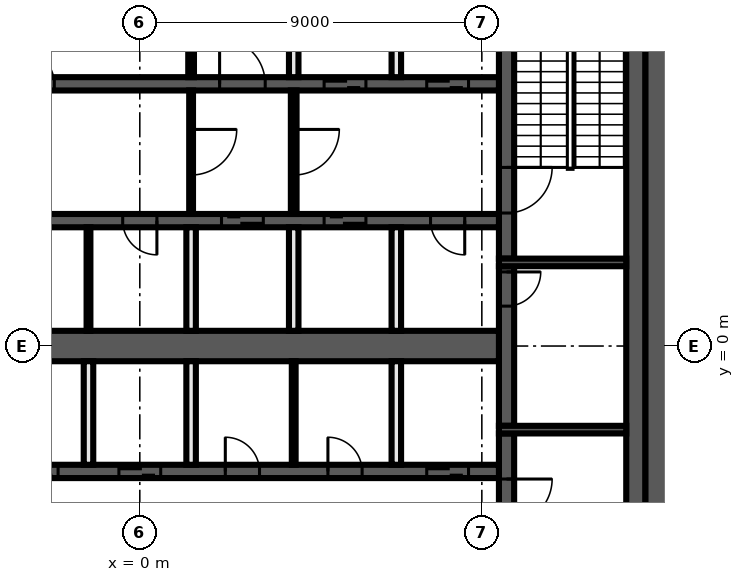
"""IFC4 building model, lengths in metres.
Left out: names, types, materials, properties, quantities, classifications, styles, units other than length and angle.
Written with IfcOpenShell. Run it as: python <this file> out.ifc"""

import sys

from ifc_helpers import new_model, si_unit, direction, frame, frame_2d, origin, place, context, subcontext, project, spatial, rectangle, extrude, element, fill, save


model = new_model("IFC4")
c1 = context("Model", 3, precision=1e-05, world=origin(), true_north=direction((0.0, 1.0)))
c2 = subcontext(c1, "Body", "Model", "MODEL_VIEW")
j1 = project(units=[si_unit("LENGTHUNIT", "METRE"), si_unit("PLANEANGLEUNIT", "RADIAN")], contexts=[c1])
p1 = place(None, origin())
s1 = spatial("IfcSite", under=j1, at=p1, CompositionType="ELEMENT")
p2 = place(p1, origin())
s2 = spatial("IfcBuilding", under=s1, at=p2, CompositionType="ELEMENT")
p3 = place(p2, frame((0.0, 0.0, 262.2)))
s3 = spatial("IfcBuildingStorey", under=s2, at=p3, CompositionType="ELEMENT", Elevation=262.2)
p4 = place(p3, frame((13.65, 10.3, 0.0), z_axis=(0.0, 0.0, 1.0), x_axis=(0.0, -1.0, 0.0)))
e1 = element("IfcWall", 1, at=p4, inside=s3, PredefinedType="SHEAR", context=c2, shape_type="SweptSolid", body=[
    extrude(rectangle(XDim=20.6, YDim=0.7, at=frame_2d((10.3, 0.0))), origin(), (0.0, 0.0, 1.0), 3.82),
])
p5 = place(p3, frame((13.05, 9.8, 0.0), z_axis=(0.0, 0.0, 1.0), x_axis=(0.0, -1.0, 0.0)))
e2 = element("IfcWall", 2, at=p5, inside=s3, PredefinedType="SHEAR", context=c2, shape_type="SweptSolid", body=[
    extrude(rectangle(XDim=19.6, YDim=0.5, at=frame_2d((9.8, 0.0))), origin(), (0.0, 0.0, 1.0), 3.82),
])
p6 = place(p3, frame((9.65, -2.3, 0.0), z_axis=(0.0, 0.0, 1.0), x_axis=(0.0, -1.0, 0.0)))
e3 = element("IfcWall", 3, at=p6, inside=s3, PredefinedType="SHEAR", context=c2, shape_type="SweptSolid", body=[
    extrude(rectangle(XDim=7.5, YDim=0.4, at=frame_2d((3.75, 0.0))), origin(), (0.0, 0.0, 1.0), 3.82),
])
p7 = place(p6, frame((1.2, 0.0, 0.0)))
e4 = element("IfcOpeningElement", 4, at=p7, cuts=e3, PredefinedType="OPENING", context=c2, shape_type="SweptSolid", body=[
    extrude(rectangle(XDim=1.2, YDim=2.1, at=frame_2d((0.6, 1.05))), frame((0.0, 0.21, 0.0), z_axis=(0.0, -1.0, 0.0), x_axis=(1.0, 0.0, 0.0)), (0.0, 0.0, 1.0), 0.42),
])
p8 = place(p3, frame((9.65, 2.1, 0.0), z_axis=(0.0, 0.0, 1.0), x_axis=(0.0, -1.0, 0.0)))
e5 = element("IfcWall", 5, at=p8, inside=s3, PredefinedType="SHEAR", context=c2, shape_type="SweptSolid", body=[
    extrude(rectangle(XDim=4.2, YDim=0.4, at=frame_2d((2.1, 0.0))), origin(), (0.0, 0.0, 1.0), 3.82),
])
p9 = place(p8, frame((0.15, 0.0, 0.0)))
e6 = element("IfcOpeningElement", 6, at=p9, cuts=e5, PredefinedType="OPENING", context=c2, shape_type="SweptSolid", body=[
    extrude(rectangle(XDim=0.9, YDim=2.1, at=frame_2d((0.45, 1.05))), frame((0.0, 0.21, 0.0), z_axis=(0.0, -1.0, 0.0), x_axis=(1.0, 0.0, 0.0)), (0.0, 0.0, 1.0), 0.42),
])
p10 = place(p3, frame((9.65, 9.8, 0.0), z_axis=(0.0, 0.0, 1.0), x_axis=(0.0, -1.0, 0.0)))
e7 = element("IfcWall", 7, at=p10, inside=s3, PredefinedType="SHEAR", context=c2, shape_type="SweptSolid", body=[
    extrude(rectangle(XDim=7.5, YDim=0.4, at=frame_2d((3.75, 0.0))), origin(), (0.0, 0.0, 1.0), 3.82),
])
p11 = place(p10, frame((5.1, 0.0, 0.0)))
e8 = element("IfcOpeningElement", 8, at=p11, cuts=e7, PredefinedType="OPENING", context=c2, shape_type="SweptSolid", body=[
    extrude(rectangle(XDim=1.2, YDim=2.1, at=frame_2d((0.6, 1.05))), frame((0.0, 0.21, 0.0), z_axis=(0.0, -1.0, 0.0), x_axis=(1.0, 0.0, 0.0)), (0.0, 0.0, 1.0), 0.42),
])
for number, where, z_axis, x_axis in (
    (9, (9.45, 2.2, 0.0), (0.0, 0.0, 1.0), (1.0, 0.0, 0.0)),
    (10, (9.45, -2.2, 0.0), (0.0, 0.0, 1.0), (1.0, 0.0, 0.0)),
):
    element("IfcWall", number, at=place(p3, frame(where, z_axis=z_axis, x_axis=x_axis)), inside=s3, PredefinedType="SHEAR", context=c2, shape_type="SweptSolid", body=[
        extrude(rectangle(XDim=3.35, YDim=0.2, at=frame_2d((1.675, 0.0))), origin(), (0.0, 0.0, 1.0), 3.82),
    ])
p12 = place(p3, frame((-9.45, 6.9, 0.0), z_axis=(0.0, 0.0, 1.0), x_axis=(1.0, 0.0, 0.0)))
e11 = element("IfcWall", 11, at=p12, inside=s3, PredefinedType="SHEAR", context=c2, shape_type="SweptSolid", body=[
    extrude(rectangle(XDim=18.9, YDim=0.35, at=frame_2d((9.45, 0.0))), origin(), (0.0, 0.0, 1.0), 3.82),
])
p13 = place(p12, frame((11.55, 0.0, 0.0)))
e12 = element("IfcOpeningElement", 12, at=p13, cuts=e11, PredefinedType="OPENING", context=c2, shape_type="SweptSolid", body=[
    extrude(rectangle(XDim=1.2, YDim=2.1, at=frame_2d((0.6, 1.05))), frame((0.0, 0.185, 0.0), z_axis=(0.0, -1.0, 0.0), x_axis=(1.0, 0.0, 0.0)), (0.0, 0.0, 1.0), 0.37),
])
p14 = place(p12, frame((14.3, 0.0, 0.0)))
e13 = element("IfcOpeningElement", 13, at=p14, cuts=e11, PredefinedType="OPENING", context=c2, shape_type="SweptSolid", body=[
    extrude(rectangle(XDim=1.1, YDim=2.1, at=frame_2d((0.55, 1.05))), frame((0.0, 0.185, 0.0), z_axis=(0.0, -1.0, 0.0), x_axis=(1.0, 0.0, 0.0)), (0.0, 0.0, 1.0), 0.37),
])
p15 = place(p12, frame((17.0, 0.0, 0.0)))
e14 = element("IfcOpeningElement", 14, at=p15, cuts=e11, PredefinedType="OPENING", context=c2, shape_type="SweptSolid", body=[
    extrude(rectangle(XDim=1.1, YDim=2.1, at=frame_2d((0.55, 1.05))), frame((0.0, 0.185, 0.0), z_axis=(0.0, -1.0, 0.0), x_axis=(1.0, 0.0, 0.0)), (0.0, 0.0, 1.0), 0.37),
])
p16 = place(p12, frame((0.9, 0.0, 0.0)))
e15 = element("IfcOpeningElement", 15, at=p16, cuts=e11, PredefinedType="OPENING", context=c2, shape_type="SweptSolid", body=[
    extrude(rectangle(XDim=0.9, YDim=2.1, at=frame_2d((0.45, 1.05))), frame((0.0, 0.185, 0.0), z_axis=(0.0, -1.0, 0.0), x_axis=(1.0, 0.0, 0.0)), (0.0, 0.0, 1.0), 0.37),
])
p17 = place(p12, frame((6.3, 0.0, 0.0)))
e16 = element("IfcOpeningElement", 16, at=p17, cuts=e11, PredefinedType="OPENING", context=c2, shape_type="SweptSolid", body=[
    extrude(rectangle(XDim=0.9, YDim=2.1, at=frame_2d((0.45, 1.05))), frame((0.0, 0.185, 0.0), z_axis=(0.0, -1.0, 0.0), x_axis=(1.0, 0.0, 0.0)), (0.0, 0.0, 1.0), 0.37),
])
p18 = place(p3, frame((9.45, 3.3, 0.0), z_axis=(0.0, 0.0, 1.0), x_axis=(-1.0, 0.0, 0.0)))
e17 = element("IfcWall", 17, at=p18, inside=s3, PredefinedType="SHEAR", context=c2, shape_type="SweptSolid", body=[
    extrude(rectangle(XDim=18.9, YDim=0.35, at=frame_2d((9.45, 0.0))), origin(), (0.0, 0.0, 1.0), 3.82),
])
p19 = place(p18, frame((6.2, 0.0, 0.0)))
e18 = element("IfcOpeningElement", 18, at=p19, cuts=e17, PredefinedType="OPENING", context=c2, shape_type="SweptSolid", body=[
    extrude(rectangle(XDim=1.1, YDim=2.1, at=frame_2d((0.55, 1.05))), frame((0.0, 0.185, 0.0), z_axis=(0.0, -1.0, 0.0), x_axis=(1.0, 0.0, 0.0)), (0.0, 0.0, 1.0), 0.37),
])
p20 = place(p18, frame((3.5, 0.0, 0.0)))
e19 = element("IfcOpeningElement", 19, at=p20, cuts=e17, PredefinedType="OPENING", context=c2, shape_type="SweptSolid", body=[
    extrude(rectangle(XDim=1.1, YDim=2.1, at=frame_2d((0.55, 1.05))), frame((0.0, 0.185, 0.0), z_axis=(0.0, -1.0, 0.0), x_axis=(1.0, 0.0, 0.0)), (0.0, 0.0, 1.0), 0.37),
])
p21 = place(p18, frame((0.9, 0.0, 0.0)))
e20 = element("IfcOpeningElement", 20, at=p21, cuts=e17, PredefinedType="OPENING", context=c2, shape_type="SweptSolid", body=[
    extrude(rectangle(XDim=0.9, YDim=2.1, at=frame_2d((0.45, 1.05))), frame((0.0, 0.185, 0.0), z_axis=(0.0, -1.0, 0.0), x_axis=(1.0, 0.0, 0.0)), (0.0, 0.0, 1.0), 0.37),
])
p22 = place(p18, frame((14.4, 0.0, 0.0)))
e21 = element("IfcOpeningElement", 21, at=p22, cuts=e17, PredefinedType="OPENING", context=c2, shape_type="SweptSolid", body=[
    extrude(rectangle(XDim=0.9, YDim=2.1, at=frame_2d((0.45, 1.05))), frame((0.0, 0.185, 0.0), z_axis=(0.0, -1.0, 0.0), x_axis=(1.0, 0.0, 0.0)), (0.0, 0.0, 1.0), 0.37),
])
p23 = place(p18, frame((9.0, 0.0, 0.0)))
e22 = element("IfcOpeningElement", 22, at=p23, cuts=e17, PredefinedType="OPENING", context=c2, shape_type="SweptSolid", body=[
    extrude(rectangle(XDim=0.9, YDim=2.1, at=frame_2d((0.45, 1.05))), frame((0.0, 0.185, 0.0), z_axis=(0.0, -1.0, 0.0), x_axis=(1.0, 0.0, 0.0)), (0.0, 0.0, 1.0), 0.37),
])
p24 = place(p3, frame((-9.45, -3.3, 0.0), z_axis=(0.0, 0.0, 1.0), x_axis=(1.0, 0.0, 0.0)))
e23 = element("IfcWall", 23, at=p24, inside=s3, PredefinedType="SHEAR", context=c2, shape_type="SweptSolid", body=[
    extrude(rectangle(XDim=18.9, YDim=0.35, at=frame_2d((9.45, 0.0))), origin(), (0.0, 0.0, 1.0), 3.82),
])
p25 = place(p24, frame((0.8, 0.0, 0.0)))
e24 = element("IfcOpeningElement", 24, at=p25, cuts=e23, PredefinedType="OPENING", context=c2, shape_type="SweptSolid", body=[
    extrude(rectangle(XDim=1.1, YDim=2.1, at=frame_2d((0.55, 1.05))), frame((0.0, 0.185, 0.0), z_axis=(0.0, -1.0, 0.0), x_axis=(1.0, 0.0, 0.0)), (0.0, 0.0, 1.0), 0.37),
])
p26 = place(p24, frame((3.5, 0.0, 0.0)))
e25 = element("IfcOpeningElement", 25, at=p26, cuts=e23, PredefinedType="OPENING", context=c2, shape_type="SweptSolid", body=[
    extrude(rectangle(XDim=1.1, YDim=2.1, at=frame_2d((0.55, 1.05))), frame((0.0, 0.185, 0.0), z_axis=(0.0, -1.0, 0.0), x_axis=(1.0, 0.0, 0.0)), (0.0, 0.0, 1.0), 0.37),
])
p27 = place(p24, frame((6.2, 0.0, 0.0)))
e26 = element("IfcOpeningElement", 26, at=p27, cuts=e23, PredefinedType="OPENING", context=c2, shape_type="SweptSolid", body=[
    extrude(rectangle(XDim=1.1, YDim=2.1, at=frame_2d((0.55, 1.05))), frame((0.0, 0.185, 0.0), z_axis=(0.0, -1.0, 0.0), x_axis=(1.0, 0.0, 0.0)), (0.0, 0.0, 1.0), 0.37),
])
p28 = place(p24, frame((8.9, 0.0, 0.0)))
e27 = element("IfcOpeningElement", 27, at=p28, cuts=e23, PredefinedType="OPENING", context=c2, shape_type="SweptSolid", body=[
    extrude(rectangle(XDim=1.1, YDim=2.1, at=frame_2d((0.55, 1.05))), frame((0.0, 0.185, 0.0), z_axis=(0.0, -1.0, 0.0), x_axis=(1.0, 0.0, 0.0)), (0.0, 0.0, 1.0), 0.37),
])
p29 = place(p24, frame((17.0, 0.0, 0.0)))
e28 = element("IfcOpeningElement", 28, at=p29, cuts=e23, PredefinedType="OPENING", context=c2, shape_type="SweptSolid", body=[
    extrude(rectangle(XDim=1.1, YDim=2.1, at=frame_2d((0.55, 1.05))), frame((0.0, 0.185, 0.0), z_axis=(0.0, -1.0, 0.0), x_axis=(1.0, 0.0, 0.0)), (0.0, 0.0, 1.0), 0.37),
])
p30 = place(p24, frame((11.7, 0.0, 0.0)))
e29 = element("IfcOpeningElement", 29, at=p30, cuts=e23, PredefinedType="OPENING", context=c2, shape_type="SweptSolid", body=[
    extrude(rectangle(XDim=0.9, YDim=2.1, at=frame_2d((0.45, 1.05))), frame((0.0, 0.185, 0.0), z_axis=(0.0, -1.0, 0.0), x_axis=(1.0, 0.0, 0.0)), (0.0, 0.0, 1.0), 0.37),
])
p31 = place(p24, frame((14.4, 0.0, 0.0)))
e30 = element("IfcOpeningElement", 30, at=p31, cuts=e23, PredefinedType="OPENING", context=c2, shape_type="SweptSolid", body=[
    extrude(rectangle(XDim=0.9, YDim=2.1, at=frame_2d((0.45, 1.05))), frame((0.0, 0.185, 0.0), z_axis=(0.0, -1.0, 0.0), x_axis=(1.0, 0.0, 0.0)), (0.0, 0.0, 1.0), 0.37),
])
p32 = place(p3, frame((-9.45, 0.0, 0.0), z_axis=(0.0, 0.0, 1.0), x_axis=(1.0, 0.0, 0.0)))
e31 = element("IfcWall", 31, at=p32, inside=s3, PredefinedType="SHEAR", context=c2, shape_type="SweptSolid", body=[
    extrude(rectangle(XDim=18.9, YDim=0.8, at=frame_2d((9.45, 0.0))), origin(), (0.0, 0.0, 1.0), 3.82),
])
for number, where, z_axis, x_axis in (
    (32, (6.75, -3.125, 0.0), (0.0, 0.0, 1.0), (0.0, 1.0, 0.0)),
    (33, (6.75, 0.4, 0.0), (0.0, 0.0, 1.0), (0.0, 1.0, 0.0)),
    (34, (6.75, 7.075, 0.0), (0.0, 0.0, 1.0), (0.0, 1.0, 0.0)),
):
    element("IfcWall", number, at=place(p3, frame(where, z_axis=z_axis, x_axis=x_axis)), inside=s3, PredefinedType="SOLIDWALL", context=c2, shape_type="SweptSolid", body=[
        extrude(rectangle(XDim=2.725, YDim=0.25, at=frame_2d((1.363, 0.0))), origin(), (0.0, 0.0, 1.0), 3.82),
    ])
p33 = place(p3, frame((4.05, 6.725, 0.0), z_axis=(0.0, 0.0, 1.0), x_axis=(0.0, -1.0, 0.0)))
e35 = element("IfcWall", 35, at=p33, inside=s3, PredefinedType="PARTITIONING", context=c2, shape_type="SweptSolid", body=[
    extrude(rectangle(XDim=3.25, YDim=0.15, at=frame_2d((1.625, 0.0))), origin(), (0.0, 0.0, 1.0), 3.82),
])
p34 = place(p33, frame((1.025, 0.0, 0.0)))
e36 = element("IfcOpeningElement", 36, at=p34, cuts=e35, PredefinedType="OPENING", context=c2, shape_type="SweptSolid", body=[
    extrude(rectangle(XDim=1.2, YDim=2.1, at=frame_2d((0.6, 1.05))), frame((0.0, 0.085, 0.0), z_axis=(0.0, -1.0, 0.0), x_axis=(1.0, 0.0, 0.0)), (0.0, 0.0, 1.0), 0.17),
])
p35 = place(p3, frame((4.05, -3.125, 0.0), z_axis=(0.0, 0.0, 1.0), x_axis=(0.0, 1.0, 0.0)))
e37 = element("IfcWall", 37, at=p35, inside=s3, PredefinedType="PARTITIONING", context=c2, shape_type="SweptSolid", body=[
    extrude(rectangle(XDim=2.725, YDim=0.1, at=frame_2d((1.363, 0.0))), origin(), (0.0, 0.0, 1.0), 3.82),
])
for number, where, z_axis, x_axis in (
    (38, (4.05, 0.4, 0.0), (0.0, 0.0, 1.0), (0.0, 1.0, 0.0)),
    (39, (4.05, 7.075, 0.0), (0.0, 0.0, 1.0), (0.0, 1.0, 0.0)),
):
    element("IfcWall", number, at=place(p3, frame(where, z_axis=z_axis, x_axis=x_axis)), inside=s3, PredefinedType="SOLIDWALL", context=c2, shape_type="SweptSolid", body=[
        extrude(rectangle(XDim=2.725, YDim=0.25, at=frame_2d((1.363, 0.0))), origin(), (0.0, 0.0, 1.0), 3.82),
    ])
p36 = place(p3, frame((1.35, 7.075, 0.0), z_axis=(0.0, 0.0, 1.0), x_axis=(0.0, 1.0, 0.0)))
e40 = element("IfcWall", 40, at=p36, inside=s3, PredefinedType="PARTITIONING", context=c2, shape_type="SweptSolid", body=[
    extrude(rectangle(XDim=2.725, YDim=0.15, at=frame_2d((1.363, 0.0))), origin(), (0.0, 0.0, 1.0), 3.82),
])
p37 = place(p3, frame((1.35, 6.725, 0.0), z_axis=(0.0, 0.0, 1.0), x_axis=(0.0, -1.0, 0.0)))
e41 = element("IfcWall", 41, at=p37, inside=s3, PredefinedType="PARTITIONING", context=c2, shape_type="SweptSolid", body=[
    extrude(rectangle(XDim=3.25, YDim=0.1, at=frame_2d((1.625, 0.0))), origin(), (0.0, 0.0, 1.0), 3.82),
])
p38 = place(p37, frame((1.025, 0.0, 0.0)))
e42 = element("IfcOpeningElement", 42, at=p38, cuts=e41, PredefinedType="OPENING", context=c2, shape_type="SweptSolid", body=[
    extrude(rectangle(XDim=1.2, YDim=2.1, at=frame_2d((0.6, 1.05))), frame((0.0, 0.06, 0.0), z_axis=(0.0, -1.0, 0.0), x_axis=(1.0, 0.0, 0.0)), (0.0, 0.0, 1.0), 0.12),
])
for number, where, z_axis, x_axis in (
    (43, (1.35, -3.125, 0.0), (0.0, 0.0, 1.0), (0.0, 1.0, 0.0)),
    (44, (1.35, 0.4, 0.0), (0.0, 0.0, 1.0), (0.0, 1.0, 0.0)),
):
    element("IfcWall", number, at=place(p3, frame(where, z_axis=z_axis, x_axis=x_axis)), inside=s3, PredefinedType="SOLIDWALL", context=c2, shape_type="SweptSolid", body=[
        extrude(rectangle(XDim=2.725, YDim=0.25, at=frame_2d((1.363, 0.0))), origin(), (0.0, 0.0, 1.0), 3.82),
    ])
p39 = place(p3, frame((-1.35, 0.4, 0.0), z_axis=(0.0, 0.0, 1.0), x_axis=(0.0, 1.0, 0.0)))
e45 = element("IfcWall", 45, at=p39, inside=s3, PredefinedType="PARTITIONING", context=c2, shape_type="SweptSolid", body=[
    extrude(rectangle(XDim=2.725, YDim=0.1, at=frame_2d((1.363, 0.0))), origin(), (0.0, 0.0, 1.0), 3.82),
])
p40 = place(p3, frame((-1.35, -3.125, 0.0), z_axis=(0.0, 0.0, 1.0), x_axis=(0.0, 1.0, 0.0)))
e46 = element("IfcWall", 46, at=p40, inside=s3, PredefinedType="SOLIDWALL", context=c2, shape_type="SweptSolid", body=[
    extrude(rectangle(XDim=2.725, YDim=0.25, at=frame_2d((1.363, 0.0))), origin(), (0.0, 0.0, 1.0), 3.82),
])
p41 = place(p9, origin())
e47 = element("IfcDoor", 47, at=p41, inside=s3, OperationType="SINGLE_SWING_RIGHT", PredefinedType="DOOR", context=c2, shape_type="SweptSolid", body=[
    extrude(rectangle(XDim=0.9, YDim=2.1, at=frame_2d((0.45, 1.05))), frame((0.0, 0.025, 0.0), z_axis=(0.0, -1.0, 0.0), x_axis=(1.0, 0.0, 0.0)), (0.0, 0.0, 1.0), 0.05),
])
fill(e6, e47)
p42 = place(p13, origin())
e48 = element("IfcDoor", 48, at=p42, inside=s3, OperationType="SINGLE_SWING_LEFT", PredefinedType="DOOR", context=c2, shape_type="SweptSolid", body=[
    extrude(rectangle(XDim=1.2, YDim=2.1, at=frame_2d((0.6, 1.05))), frame((0.0, 0.025, 0.0), z_axis=(0.0, -1.0, 0.0), x_axis=(1.0, 0.0, 0.0)), (0.0, 0.0, 1.0), 0.05),
])
fill(e12, e48)
p43 = place(p14, origin())
e49 = element("IfcDoor", 49, at=p43, inside=s3, OperationType="DOUBLE_DOOR_SLIDING", PredefinedType="DOOR", context=c2, shape_type="SweptSolid", body=[
    extrude(rectangle(XDim=1.1, YDim=2.1, at=frame_2d((0.55, 1.05))), frame((0.0, 0.025, 0.0), z_axis=(0.0, -1.0, 0.0), x_axis=(1.0, 0.0, 0.0)), (0.0, 0.0, 1.0), 0.05),
])
fill(e13, e49)
p44 = place(p15, origin())
e50 = element("IfcDoor", 50, at=p44, inside=s3, OperationType="DOUBLE_DOOR_SLIDING", PredefinedType="DOOR", context=c2, shape_type="SweptSolid", body=[
    extrude(rectangle(XDim=1.1, YDim=2.1, at=frame_2d((0.55, 1.05))), frame((0.0, 0.025, 0.0), z_axis=(0.0, -1.0, 0.0), x_axis=(1.0, 0.0, 0.0)), (0.0, 0.0, 1.0), 0.05),
])
fill(e14, e50)
p45 = place(p19, origin())
e51 = element("IfcDoor", 51, at=p45, inside=s3, OperationType="DOUBLE_DOOR_SLIDING", PredefinedType="DOOR", context=c2, shape_type="SweptSolid", body=[
    extrude(rectangle(XDim=1.1, YDim=2.1, at=frame_2d((0.55, 1.05))), frame((0.0, 0.025, 0.0), z_axis=(0.0, -1.0, 0.0), x_axis=(1.0, 0.0, 0.0)), (0.0, 0.0, 1.0), 0.05),
])
fill(e18, e51)
p46 = place(p20, origin())
e52 = element("IfcDoor", 52, at=p46, inside=s3, OperationType="DOUBLE_DOOR_SLIDING", PredefinedType="DOOR", context=c2, shape_type="SweptSolid", body=[
    extrude(rectangle(XDim=1.1, YDim=2.1, at=frame_2d((0.55, 1.05))), frame((0.0, 0.025, 0.0), z_axis=(0.0, -1.0, 0.0), x_axis=(1.0, 0.0, 0.0)), (0.0, 0.0, 1.0), 0.05),
])
fill(e19, e52)
p47 = place(p21, origin())
e53 = element("IfcDoor", 53, at=p47, inside=s3, OperationType="SINGLE_SWING_LEFT", PredefinedType="DOOR", context=c2, shape_type="SweptSolid", body=[
    extrude(rectangle(XDim=0.9, YDim=2.1, at=frame_2d((0.45, 1.05))), frame((0.0, 0.025, 0.0), z_axis=(0.0, -1.0, 0.0), x_axis=(1.0, 0.0, 0.0)), (0.0, 0.0, 1.0), 0.05),
])
fill(e20, e53)
p48 = place(p27, origin())
e54 = element("IfcDoor", 54, at=p48, inside=s3, OperationType="DOUBLE_DOOR_SLIDING", PredefinedType="DOOR", context=c2, shape_type="SweptSolid", body=[
    extrude(rectangle(XDim=1.1, YDim=2.1, at=frame_2d((0.55, 1.05))), frame((0.0, 0.025, 0.0), z_axis=(0.0, -1.0, 0.0), x_axis=(1.0, 0.0, 0.0)), (0.0, 0.0, 1.0), 0.05),
])
fill(e26, e54)
p49 = place(p28, origin())
e55 = element("IfcDoor", 55, at=p49, inside=s3, OperationType="DOUBLE_DOOR_SLIDING", PredefinedType="DOOR", context=c2, shape_type="SweptSolid", body=[
    extrude(rectangle(XDim=1.1, YDim=2.1, at=frame_2d((0.55, 1.05))), frame((0.0, 0.025, 0.0), z_axis=(0.0, -1.0, 0.0), x_axis=(1.0, 0.0, 0.0)), (0.0, 0.0, 1.0), 0.05),
])
fill(e27, e55)
p50 = place(p29, origin())
e56 = element("IfcDoor", 56, at=p50, inside=s3, OperationType="DOUBLE_DOOR_SLIDING", PredefinedType="DOOR", context=c2, shape_type="SweptSolid", body=[
    extrude(rectangle(XDim=1.1, YDim=2.1, at=frame_2d((0.55, 1.05))), frame((0.0, 0.025, 0.0), z_axis=(0.0, -1.0, 0.0), x_axis=(1.0, 0.0, 0.0)), (0.0, 0.0, 1.0), 0.05),
])
fill(e28, e56)
p51 = place(p17, origin())
e57 = element("IfcDoor", 57, at=p51, inside=s3, OperationType="SINGLE_SWING_LEFT", PredefinedType="DOOR", context=c2, shape_type="SweptSolid", body=[
    extrude(rectangle(XDim=0.9, YDim=2.1, at=frame_2d((0.45, 1.05))), frame((0.0, 0.025, 0.0), z_axis=(0.0, -1.0, 0.0), x_axis=(1.0, 0.0, 0.0)), (0.0, 0.0, 1.0), 0.05),
])
fill(e16, e57)
p52 = place(p23, origin())
e58 = element("IfcDoor", 58, at=p52, inside=s3, OperationType="SINGLE_SWING_LEFT", PredefinedType="DOOR", context=c2, shape_type="SweptSolid", body=[
    extrude(rectangle(XDim=0.9, YDim=2.1, at=frame_2d((0.45, 1.05))), frame((0.0, 0.025, 0.0), z_axis=(0.0, -1.0, 0.0), x_axis=(1.0, 0.0, 0.0)), (0.0, 0.0, 1.0), 0.05),
])
fill(e22, e58)
p53 = place(p30, origin())
e59 = element("IfcDoor", 59, at=p53, inside=s3, OperationType="SINGLE_SWING_RIGHT", PredefinedType="DOOR", context=c2, shape_type="SweptSolid", body=[
    extrude(rectangle(XDim=0.9, YDim=2.1, at=frame_2d((0.45, 1.05))), frame((0.0, 0.025, 0.0), z_axis=(0.0, -1.0, 0.0), x_axis=(1.0, 0.0, 0.0)), (0.0, 0.0, 1.0), 0.05),
])
fill(e29, e59)
p54 = place(p31, origin())
e60 = element("IfcDoor", 60, at=p54, inside=s3, OperationType="SINGLE_SWING_LEFT", PredefinedType="DOOR", context=c2, shape_type="SweptSolid", body=[
    extrude(rectangle(XDim=0.9, YDim=2.1, at=frame_2d((0.45, 1.05))), frame((0.0, 0.025, 0.0), z_axis=(0.0, -1.0, 0.0), x_axis=(1.0, 0.0, 0.0)), (0.0, 0.0, 1.0), 0.05),
])
fill(e30, e60)
p55 = place(p11, origin())
e61 = element("IfcDoor", 61, at=p55, inside=s3, OperationType="SINGLE_SWING_LEFT", PredefinedType="DOOR", context=c2, shape_type="SweptSolid", body=[
    extrude(rectangle(XDim=1.2, YDim=2.1, at=frame_2d((0.6, 1.05))), frame((0.0, 0.025, 0.0), z_axis=(0.0, -1.0, 0.0), x_axis=(1.0, 0.0, 0.0)), (0.0, 0.0, 1.0), 0.05),
])
fill(e8, e61)
p56 = place(p7, origin())
e62 = element("IfcDoor", 62, at=p56, inside=s3, OperationType="SINGLE_SWING_RIGHT", PredefinedType="DOOR", context=c2, shape_type="SweptSolid", body=[
    extrude(rectangle(XDim=1.2, YDim=2.1, at=frame_2d((0.6, 1.05))), frame((0.0, 0.025, 0.0), z_axis=(0.0, -1.0, 0.0), x_axis=(1.0, 0.0, 0.0)), (0.0, 0.0, 1.0), 0.05),
])
fill(e4, e62)
p57 = place(p38, origin())
e63 = element("IfcDoor", 63, at=p57, inside=s3, OperationType="SINGLE_SWING_LEFT", PredefinedType="DOOR", context=c2, shape_type="SweptSolid", body=[
    extrude(rectangle(XDim=1.2, YDim=2.1, at=frame_2d((0.6, 1.05))), frame((0.0, 0.025, 0.0), z_axis=(0.0, -1.0, 0.0), x_axis=(1.0, 0.0, 0.0)), (0.0, 0.0, 1.0), 0.05),
])
fill(e42, e63)
p58 = place(p34, origin())
e64 = element("IfcDoor", 64, at=p58, inside=s3, OperationType="SINGLE_SWING_RIGHT", PredefinedType="DOOR", context=c2, shape_type="SweptSolid", body=[
    extrude(rectangle(XDim=1.2, YDim=2.1, at=frame_2d((0.6, 1.05))), frame((0.0, 0.025, 0.0), z_axis=(0.0, -1.0, 0.0), x_axis=(1.0, 0.0, 0.0)), (0.0, 0.0, 1.0), 0.05),
])
fill(e36, e64)
save(model, sys.argv[1])
